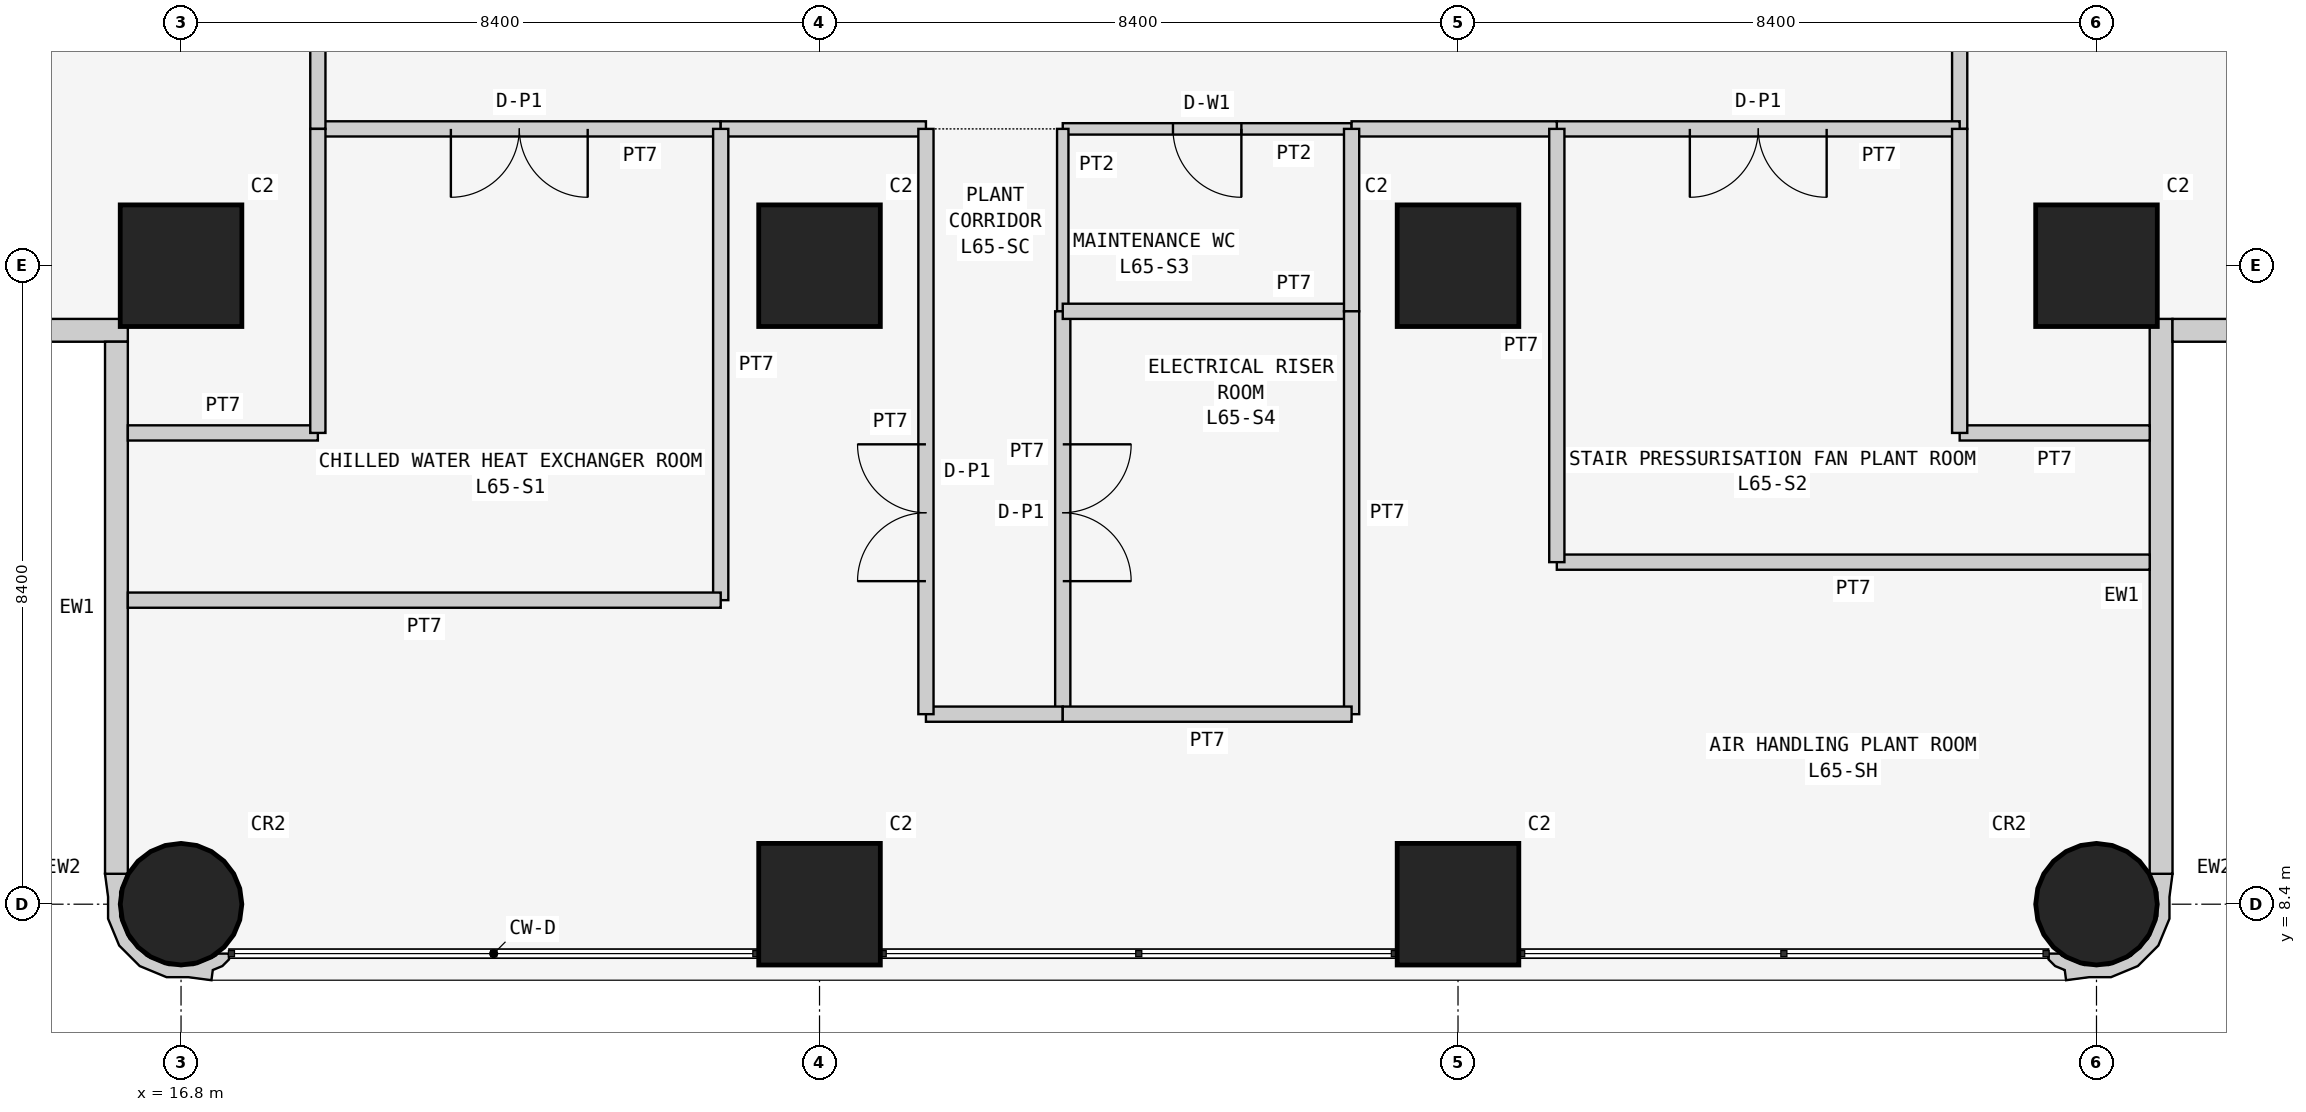
"""IFC4 building model, lengths in metres.
Left out: names, types, materials, properties, quantities, classifications, styles, units other than length and angle.
Written with IfcOpenShell. Run it as: python <this file> out.ifc"""

import sys

from ifc_helpers import new_model, si_unit, direction, frame, frame_2d, origin, origin_2d, place, context, subcontext, project, spatial, polyline, rectangle, circle, outline, extrude, element, fill, save


model = new_model("IFC4")
c1 = context("Model", 3, precision=1e-05, world=origin(), true_north=direction((0.0, 1.0)))
c2 = subcontext(c1, "Body", "Model", "MODEL_VIEW")
j1 = project(units=[si_unit("LENGTHUNIT", "METRE"), si_unit("PLANEANGLEUNIT", "RADIAN")], contexts=[c1])
p1 = place(None, origin())
s1 = spatial("IfcSite", under=j1, at=p1, CompositionType="ELEMENT")
p2 = place(p1, origin())
s2 = spatial("IfcBuilding", under=s1, at=p2, CompositionType="ELEMENT")
p3 = place(p2, frame((0.0, 0.0, 248.1)))
s3 = spatial("IfcBuildingStorey", under=s2, at=p3, CompositionType="ELEMENT", Elevation=248.1)
p4 = place(p3, frame((16.8, 8.4, 0.0), z_axis=(0.0, 0.0, 1.0), x_axis=(1.0, 0.0, 0.0)))
e1 = element("IfcColumn", 1, at=p4, inside=s3, PredefinedType="COLUMN", context=c2, shape_type="SweptSolid", body=[
    extrude(circle(Radius=0.8, at=origin_2d()), origin(), (0.0, 0.0, 1.0), 6.0),
])
for number, where, z_axis, x_axis in (
    (2, (16.8, 16.8, 0.0), (0.0, 0.0, 1.0), (1.0, 0.0, 0.0)),
    (3, (25.2, 8.4, 0.0), (0.0, 0.0, 1.0), (1.0, 0.0, 0.0)),
    (4, (25.2, 16.8, 0.0), (0.0, 0.0, 1.0), (1.0, 0.0, 0.0)),
    (5, (33.6, 8.4, 0.0), (0.0, 0.0, 1.0), (1.0, 0.0, 0.0)),
    (6, (33.6, 16.8, 0.0), (0.0, 0.0, 1.0), (1.0, 0.0, 0.0)),
):
    element("IfcColumn", number, at=place(p3, frame(where, z_axis=z_axis, x_axis=x_axis)), inside=s3, PredefinedType="COLUMN", context=c2, shape_type="SweptSolid", body=[
        extrude(rectangle(XDim=1.6, YDim=1.6, at=origin_2d()), origin(), (0.0, 0.0, 1.0), 6.0),
    ])
p5 = place(p3, frame((42.0, 8.4, 0.0), z_axis=(0.0, 0.0, 1.0), x_axis=(1.0, 0.0, 0.0)))
e7 = element("IfcColumn", 7, at=p5, inside=s3, PredefinedType="COLUMN", context=c2, shape_type="SweptSolid", body=[
    extrude(circle(Radius=0.8, at=origin_2d()), origin(), (0.0, 0.0, 1.0), 6.0),
])
p6 = place(p3, frame((42.0, 16.8, 0.0), z_axis=(0.0, 0.0, 1.0), x_axis=(1.0, 0.0, 0.0)))
e8 = element("IfcColumn", 8, at=p6, inside=s3, PredefinedType="COLUMN", context=c2, shape_type="SweptSolid", body=[
    extrude(rectangle(XDim=1.6, YDim=1.6, at=origin_2d()), origin(), (0.0, 0.0, 1.0), 6.0),
])
p7 = place(p3, frame((0.4, 15.95, 0.0), z_axis=(0.0, 0.0, 1.0), x_axis=(1.0, 0.0, 0.0)))
e9 = element("IfcWall", 9, at=p7, inside=s3, PredefinedType="SOLIDWALL", context=c2, shape_type="SweptSolid", body=[
    extrude(rectangle(XDim=15.7, YDim=0.3, at=frame_2d((7.85, 0.0))), origin(), (0.0, 0.0, 1.0), 5.85),
])
p8 = place(p3, frame((15.95, 15.8, 0.0), z_axis=(0.0, 0.0, 1.0), x_axis=(0.0, -1.0, 0.0)))
e10 = element("IfcWall", 10, at=p8, inside=s3, PredefinedType="SOLIDWALL", context=c2, shape_type="SweptSolid", body=[
    extrude(rectangle(XDim=7.0, YDim=0.3, at=frame_2d((3.5, 0.0))), origin(), (0.0, 0.0, 1.0), 5.85),
])
p9 = place(p3, frame((42.85, 8.8, 0.0), z_axis=(0.0, 0.0, 1.0), x_axis=(0.0, 1.0, 0.0)))
e11 = element("IfcWall", 11, at=p9, inside=s3, PredefinedType="SOLIDWALL", context=c2, shape_type="SweptSolid", body=[
    extrude(rectangle(XDim=7.3, YDim=0.3, at=frame_2d((3.65, 0.0))), origin(), (0.0, 0.0, 1.0), 5.85),
])
p10 = place(p3, frame((43.0, 15.95, 0.0), z_axis=(0.0, 0.0, 1.0), x_axis=(1.0, 0.0, 0.0)))
e12 = element("IfcWall", 12, at=p10, inside=s3, PredefinedType="SOLIDWALL", context=c2, shape_type="SweptSolid", body=[
    extrude(rectangle(XDim=7.0, YDim=0.3, at=frame_2d((3.5, 0.0))), origin(), (0.0, 0.0, 1.0), 5.85),
])
p11 = place(p3, frame((15.983, 8.727, 0.0), z_axis=(0.0, 0.0, 1.0), x_axis=(-0.34958262992, -0.936905536785, 0.0)))
e13 = element("IfcWall", 13, at=p11, inside=s3, PredefinedType="SOLIDWALL", context=c2, shape_type="SweptSolid", body=[
    extrude(outline(polyline([(0.818, 1.604), (0.686, 1.574), (0.593, 1.674), (0.481, 1.725), (0.409, 1.698), (0.461, 1.559), (0.498, 1.542), (0.715, 1.309), (0.827, 1.01), (0.815, 0.692), (0.683, 0.402), (0.45, 0.185), (0.151, 0.074), (-0.117, 0.083), (-0.128, 0.077), (-0.147, 0.07), (-0.005, -0.197), (0.266, -0.053), (0.535, 0.047), (0.815, 0.307), (0.973, 0.655), (0.987, 1.036), (0.886, 1.306), (0.818, 1.604)])), origin(), (0.0, 0.0, 1.0), 5.85),
])
p12 = place(p3, frame((41.423, 7.735, 0.0), z_axis=(0.0, 0.0, 1.0), x_axis=(0.34958262992, -0.936905536785, 0.0)))
e14 = element("IfcWall", 14, at=p12, inside=s3, PredefinedType="SOLIDWALL", context=c2, shape_type="SweptSolid", body=[
    extrude(outline(polyline([(-0.446, 1.85), (-0.588, 1.582), (-0.569, 1.575), (-0.558, 1.569), (-0.29, 1.579), (0.008, 1.468), (0.242, 1.25), (0.374, 0.96), (0.385, 0.642), (0.274, 0.344), (0.057, 0.11), (0.019, 0.093), (-0.033, -0.046), (0.039, -0.072), (0.151, -0.021), (0.244, 0.079), (0.376, 0.048), (0.445, 0.347), (0.545, 0.616), (0.532, 0.998), (0.373, 1.345), (0.094, 1.605), (-0.175, 1.706), (-0.446, 1.85)])), origin(), (0.0, 0.0, 1.0), 5.85),
])
p13 = place(p3, frame((40.2, 23.9, 0.0), z_axis=(0.0, 0.0, 1.0), x_axis=(0.0, -1.0, 0.0)))
e15 = element("IfcWall", 15, at=p13, inside=s3, PredefinedType="PARTITIONING", context=c2, shape_type="SweptSolid", body=[
    extrude(rectangle(XDim=5.3, YDim=0.2, at=frame_2d((2.65, 0.0))), origin(), (0.0, 0.0, 1.0), 5.85),
])
p14 = place(p13, frame((1.75, 0.0, 0.0)))
e16 = element("IfcOpeningElement", 16, at=p14, cuts=e15, PredefinedType="OPENING", context=c2, shape_type="SweptSolid", body=[
    extrude(rectangle(XDim=1.8, YDim=2.4, at=frame_2d((0.9, 1.2))), frame((0.0, 0.11, 0.0), z_axis=(0.0, -1.0, 0.0), x_axis=(1.0, 0.0, 0.0)), (0.0, 0.0, 1.0), 0.22),
])
p15 = place(p3, frame((23.9, 18.6, 0.0), z_axis=(0.0, 0.0, 1.0), x_axis=(-1.0, 0.0, 0.0)))
e17 = element("IfcWall", 17, at=p15, inside=s3, PredefinedType="PARTITIONING", context=c2, shape_type="SweptSolid", body=[
    extrude(rectangle(XDim=5.3, YDim=0.2, at=frame_2d((2.65, 0.0))), origin(), (0.0, 0.0, 1.0), 5.85),
])
p16 = place(p15, frame((1.75, 0.0, 0.0)))
e18 = element("IfcOpeningElement", 18, at=p16, cuts=e17, PredefinedType="OPENING", context=c2, shape_type="SweptSolid", body=[
    extrude(rectangle(XDim=1.8, YDim=2.4, at=frame_2d((0.9, 1.2))), frame((0.0, 0.11, 0.0), z_axis=(0.0, -1.0, 0.0), x_axis=(1.0, 0.0, 0.0)), (0.0, 0.0, 1.0), 0.22),
])
p17 = place(p3, frame((40.2, 18.6, 0.0), z_axis=(0.0, 0.0, 1.0), x_axis=(-1.0, 0.0, 0.0)))
e19 = element("IfcWall", 19, at=p17, inside=s3, PredefinedType="PARTITIONING", context=c2, shape_type="SweptSolid", body=[
    extrude(rectangle(XDim=5.3, YDim=0.2, at=frame_2d((2.65, 0.0))), origin(), (0.0, 0.0, 1.0), 5.85),
])
p18 = place(p17, frame((1.75, 0.0, 0.0)))
e20 = element("IfcOpeningElement", 20, at=p18, cuts=e19, PredefinedType="OPENING", context=c2, shape_type="SweptSolid", body=[
    extrude(rectangle(XDim=1.8, YDim=2.4, at=frame_2d((0.9, 1.2))), frame((0.0, 0.11, 0.0), z_axis=(0.0, -1.0, 0.0), x_axis=(1.0, 0.0, 0.0)), (0.0, 0.0, 1.0), 0.22),
])
p19 = place(p3, frame((32.2, 18.6, 0.0), z_axis=(0.0, 0.0, 1.0), x_axis=(-1.0, 0.0, 0.0)))
e21 = element("IfcWall", 21, at=p19, inside=s3, PredefinedType="PARTITIONING", context=c2, shape_type="SweptSolid", body=[
    extrude(rectangle(XDim=3.8, YDim=0.15, at=frame_2d((1.9, 0.0))), origin(), (0.0, 0.0, 1.0), 5.85),
])
p20 = place(p19, frame((1.45, 0.0, 0.0)))
e22 = element("IfcOpeningElement", 22, at=p20, cuts=e21, PredefinedType="OPENING", context=c2, shape_type="SweptSolid", body=[
    extrude(rectangle(XDim=0.9, YDim=2.1, at=frame_2d((0.45, 1.05))), frame((0.0, 0.085, 0.0), z_axis=(0.0, -1.0, 0.0), x_axis=(1.0, 0.0, 0.0)), (0.0, 0.0, 1.0), 0.17),
])
p21 = place(p3, frame((26.6, 18.6, 0.0), z_axis=(0.0, 0.0, 1.0), x_axis=(-1.0, 0.0, 0.0)))
e23 = element("IfcWall", 23, at=p21, inside=s3, PredefinedType="PARTITIONING", context=c2, shape_type="SweptSolid", body=[
    extrude(rectangle(XDim=2.7, YDim=0.2, at=frame_2d((1.35, 0.0))), origin(), (0.0, 0.0, 1.0), 5.85),
])
p22 = place(p3, frame((34.9, 18.6, 0.0), z_axis=(0.0, 0.0, 1.0), x_axis=(-1.0, 0.0, 0.0)))
e24 = element("IfcWall", 24, at=p22, inside=s3, PredefinedType="PARTITIONING", context=c2, shape_type="SweptSolid", body=[
    extrude(rectangle(XDim=2.7, YDim=0.2, at=frame_2d((1.35, 0.0))), origin(), (0.0, 0.0, 1.0), 5.85),
])
p23 = place(p3, frame((18.6, 18.6, 0.0), z_axis=(0.0, 0.0, 1.0), x_axis=(0.0, 1.0, 0.0)))
e25 = element("IfcWall", 25, at=p23, inside=s3, PredefinedType="PARTITIONING", context=c2, shape_type="SweptSolid", body=[
    extrude(rectangle(XDim=5.3, YDim=0.2, at=frame_2d((2.65, 0.0))), origin(), (0.0, 0.0, 1.0), 5.85),
])
p24 = place(p23, frame((1.75, 0.0, 0.0)))
e26 = element("IfcOpeningElement", 26, at=p24, cuts=e25, PredefinedType="OPENING", context=c2, shape_type="SweptSolid", body=[
    extrude(rectangle(XDim=1.8, YDim=2.4, at=frame_2d((0.9, 1.2))), frame((0.0, 0.11, 0.0), z_axis=(0.0, -1.0, 0.0), x_axis=(1.0, 0.0, 0.0)), (0.0, 0.0, 1.0), 0.22),
])
p25 = place(p3, frame((42.7, 14.6, 0.0), z_axis=(0.0, 0.0, 1.0), x_axis=(-1.0, 0.0, 0.0)))
e27 = element("IfcWall", 27, at=p25, inside=s3, PredefinedType="PARTITIONING", context=c2, shape_type="SweptSolid", body=[
    extrude(rectangle(XDim=2.5, YDim=0.2, at=frame_2d((1.25, 0.0))), origin(), (0.0, 0.0, 1.0), 5.85),
])
p26 = place(p3, frame((40.2, 14.6, 0.0), z_axis=(0.0, 0.0, 1.0), x_axis=(0.0, 1.0, 0.0)))
e28 = element("IfcWall", 28, at=p26, inside=s3, PredefinedType="PARTITIONING", context=c2, shape_type="SweptSolid", body=[
    extrude(rectangle(XDim=4.0, YDim=0.2, at=frame_2d((2.0, 0.0))), origin(), (0.0, 0.0, 1.0), 5.85),
])
p27 = place(p3, frame((23.9, 18.6, 0.0), z_axis=(0.0, 0.0, 1.0), x_axis=(0.0, -1.0, 0.0)))
e29 = element("IfcWall", 29, at=p27, inside=s3, PredefinedType="PARTITIONING", context=c2, shape_type="SweptSolid", body=[
    extrude(rectangle(XDim=6.2, YDim=0.2, at=frame_2d((3.1, 0.0))), origin(), (0.0, 0.0, 1.0), 5.85),
])
p28 = place(p3, frame((23.9, 12.4, 0.0), z_axis=(0.0, 0.0, 1.0), x_axis=(-1.0, 0.0, 0.0)))
e30 = element("IfcWall", 30, at=p28, inside=s3, PredefinedType="PARTITIONING", context=c2, shape_type="SweptSolid", body=[
    extrude(rectangle(XDim=7.8, YDim=0.2, at=frame_2d((3.9, 0.0))), origin(), (0.0, 0.0, 1.0), 5.85),
])
p29 = place(p3, frame((16.1, 14.6, 0.0), z_axis=(0.0, 0.0, 1.0), x_axis=(1.0, 0.0, 0.0)))
e31 = element("IfcWall", 31, at=p29, inside=s3, PredefinedType="PARTITIONING", context=c2, shape_type="SweptSolid", body=[
    extrude(rectangle(XDim=2.5, YDim=0.2, at=frame_2d((1.25, 0.0))), origin(), (0.0, 0.0, 1.0), 5.85),
])
p30 = place(p3, frame((18.6, 14.6, 0.0), z_axis=(0.0, 0.0, 1.0), x_axis=(0.0, 1.0, 0.0)))
e32 = element("IfcWall", 32, at=p30, inside=s3, PredefinedType="PARTITIONING", context=c2, shape_type="SweptSolid", body=[
    extrude(rectangle(XDim=4.0, YDim=0.2, at=frame_2d((2.0, 0.0))), origin(), (0.0, 0.0, 1.0), 5.85),
])
p31 = place(p3, frame((42.7, 12.9, 0.0), z_axis=(0.0, 0.0, 1.0), x_axis=(-1.0, 0.0, 0.0)))
e33 = element("IfcWall", 33, at=p31, inside=s3, PredefinedType="PARTITIONING", context=c2, shape_type="SweptSolid", body=[
    extrude(rectangle(XDim=7.8, YDim=0.2, at=frame_2d((3.9, 0.0))), origin(), (0.0, 0.0, 1.0), 5.85),
])
p32 = place(p3, frame((34.9, 12.9, 0.0), z_axis=(0.0, 0.0, 1.0), x_axis=(0.0, 1.0, 0.0)))
e34 = element("IfcWall", 34, at=p32, inside=s3, PredefinedType="PARTITIONING", context=c2, shape_type="SweptSolid", body=[
    extrude(rectangle(XDim=5.7, YDim=0.2, at=frame_2d((2.85, 0.0))), origin(), (0.0, 0.0, 1.0), 5.85),
])
p33 = place(p3, frame((28.4, 18.6, 0.0), z_axis=(0.0, 0.0, 1.0), x_axis=(0.0, -1.0, 0.0)))
e35 = element("IfcWall", 35, at=p33, inside=s3, PredefinedType="PARTITIONING", context=c2, shape_type="SweptSolid", body=[
    extrude(rectangle(XDim=2.4, YDim=0.15, at=frame_2d((1.2, 0.0))), origin(), (0.0, 0.0, 1.0), 5.85),
])
p34 = place(p3, frame((28.4, 16.2, 0.0), z_axis=(0.0, 0.0, 1.0), x_axis=(0.0, -1.0, 0.0)))
e36 = element("IfcWall", 36, at=p34, inside=s3, PredefinedType="PARTITIONING", context=c2, shape_type="SweptSolid", body=[
    extrude(rectangle(XDim=5.3, YDim=0.2, at=frame_2d((2.65, 0.0))), origin(), (0.0, 0.0, 1.0), 5.85),
])
p35 = place(p34, frame((1.75, 0.0, 0.0)))
e37 = element("IfcOpeningElement", 37, at=p35, cuts=e36, PredefinedType="OPENING", context=c2, shape_type="SweptSolid", body=[
    extrude(rectangle(XDim=1.8, YDim=2.4, at=frame_2d((0.9, 1.2))), frame((0.0, 0.11, 0.0), z_axis=(0.0, -1.0, 0.0), x_axis=(1.0, 0.0, 0.0)), (0.0, 0.0, 1.0), 0.22),
])
p36 = place(p3, frame((28.4, 10.9, 0.0), z_axis=(0.0, 0.0, 1.0), x_axis=(-1.0, 0.0, 0.0)))
e38 = element("IfcWall", 38, at=p36, inside=s3, PredefinedType="PARTITIONING", context=c2, shape_type="SweptSolid", body=[
    extrude(rectangle(XDim=1.8, YDim=0.2, at=frame_2d((0.9, 0.0))), origin(), (0.0, 0.0, 1.0), 5.85),
])
p37 = place(p3, frame((26.6, 10.9, 0.0), z_axis=(0.0, 0.0, 1.0), x_axis=(0.0, 1.0, 0.0)))
e39 = element("IfcWall", 39, at=p37, inside=s3, PredefinedType="PARTITIONING", context=c2, shape_type="SweptSolid", body=[
    extrude(rectangle(XDim=7.7, YDim=0.2, at=frame_2d((3.85, 0.0))), origin(), (0.0, 0.0, 1.0), 5.85),
])
p38 = place(p37, frame((1.75, 0.0, 0.0)))
e40 = element("IfcOpeningElement", 40, at=p38, cuts=e39, PredefinedType="OPENING", context=c2, shape_type="SweptSolid", body=[
    extrude(rectangle(XDim=1.8, YDim=2.4, at=frame_2d((0.9, 1.2))), frame((0.0, 0.11, 0.0), z_axis=(0.0, -1.0, 0.0), x_axis=(1.0, 0.0, 0.0)), (0.0, 0.0, 1.0), 0.22),
])
p39 = place(p3, frame((32.2, 16.2, 0.0), z_axis=(0.0, 0.0, 1.0), x_axis=(-1.0, 0.0, 0.0)))
e41 = element("IfcWall", 41, at=p39, inside=s3, PredefinedType="PARTITIONING", context=c2, shape_type="SweptSolid", body=[
    extrude(rectangle(XDim=3.8, YDim=0.2, at=frame_2d((1.9, 0.0))), origin(), (0.0, 0.0, 1.0), 5.85),
])
p40 = place(p3, frame((32.2, 18.6, 0.0), z_axis=(0.0, 0.0, 1.0), x_axis=(0.0, -1.0, 0.0)))
e42 = element("IfcWall", 42, at=p40, inside=s3, PredefinedType="PARTITIONING", context=c2, shape_type="SweptSolid", body=[
    extrude(rectangle(XDim=2.4, YDim=0.2, at=frame_2d((1.2, 0.0))), origin(), (0.0, 0.0, 1.0), 5.85),
])
p41 = place(p3, frame((32.2, 16.2, 0.0), z_axis=(0.0, 0.0, 1.0), x_axis=(0.0, -1.0, 0.0)))
e43 = element("IfcWall", 43, at=p41, inside=s3, PredefinedType="PARTITIONING", context=c2, shape_type="SweptSolid", body=[
    extrude(rectangle(XDim=5.3, YDim=0.2, at=frame_2d((2.65, 0.0))), origin(), (0.0, 0.0, 1.0), 5.85),
])
p42 = place(p3, frame((32.2, 10.9, 0.0), z_axis=(0.0, 0.0, 1.0), x_axis=(-1.0, 0.0, 0.0)))
e44 = element("IfcWall", 44, at=p42, inside=s3, PredefinedType="PARTITIONING", context=c2, shape_type="SweptSolid", body=[
    extrude(rectangle(XDim=3.8, YDim=0.2, at=frame_2d((1.9, 0.0))), origin(), (0.0, 0.0, 1.0), 5.85),
])
p43 = place(p16, origin())
e45 = element("IfcDoor", 45, at=p43, inside=s3, OperationType="DOUBLE_DOOR_SINGLE_SWING", PredefinedType="DOOR", context=c2, shape_type="SweptSolid", body=[
    extrude(rectangle(XDim=1.8, YDim=2.4, at=frame_2d((0.9, 1.2))), frame((0.0, 0.025, 0.0), z_axis=(0.0, -1.0, 0.0), x_axis=(1.0, 0.0, 0.0)), (0.0, 0.0, 1.0), 0.05),
])
fill(e18, e45)
p44 = place(p18, origin())
e46 = element("IfcDoor", 46, at=p44, inside=s3, OperationType="DOUBLE_DOOR_SINGLE_SWING", PredefinedType="DOOR", context=c2, shape_type="SweptSolid", body=[
    extrude(rectangle(XDim=1.8, YDim=2.4, at=frame_2d((0.9, 1.2))), frame((0.0, 0.025, 0.0), z_axis=(0.0, -1.0, 0.0), x_axis=(1.0, 0.0, 0.0)), (0.0, 0.0, 1.0), 0.05),
])
fill(e20, e46)
p45 = place(p20, origin())
e47 = element("IfcDoor", 47, at=p45, inside=s3, OperationType="SINGLE_SWING_LEFT", PredefinedType="DOOR", context=c2, shape_type="SweptSolid", body=[
    extrude(rectangle(XDim=0.9, YDim=2.1, at=frame_2d((0.45, 1.05))), frame((0.0, 0.025, 0.0), z_axis=(0.0, -1.0, 0.0), x_axis=(1.0, 0.0, 0.0)), (0.0, 0.0, 1.0), 0.05),
])
fill(e22, e47)
p46 = place(p35, origin())
e48 = element("IfcDoor", 48, at=p46, inside=s3, OperationType="DOUBLE_DOOR_SINGLE_SWING", PredefinedType="DOOR", context=c2, shape_type="SweptSolid", body=[
    extrude(rectangle(XDim=1.8, YDim=2.4, at=frame_2d((0.9, 1.2))), frame((0.0, 0.025, 0.0), z_axis=(0.0, -1.0, 0.0), x_axis=(1.0, 0.0, 0.0)), (0.0, 0.0, 1.0), 0.05),
])
fill(e37, e48)
p47 = place(p38, origin())
e49 = element("IfcDoor", 49, at=p47, inside=s3, OperationType="DOUBLE_DOOR_SINGLE_SWING", PredefinedType="DOOR", context=c2, shape_type="SweptSolid", body=[
    extrude(rectangle(XDim=1.8, YDim=2.4, at=frame_2d((0.9, 1.2))), frame((0.0, 0.025, 0.0), z_axis=(0.0, -1.0, 0.0), x_axis=(1.0, 0.0, 0.0)), (0.0, 0.0, 1.0), 0.05),
])
fill(e40, e49)
save(model, sys.argv[1])
